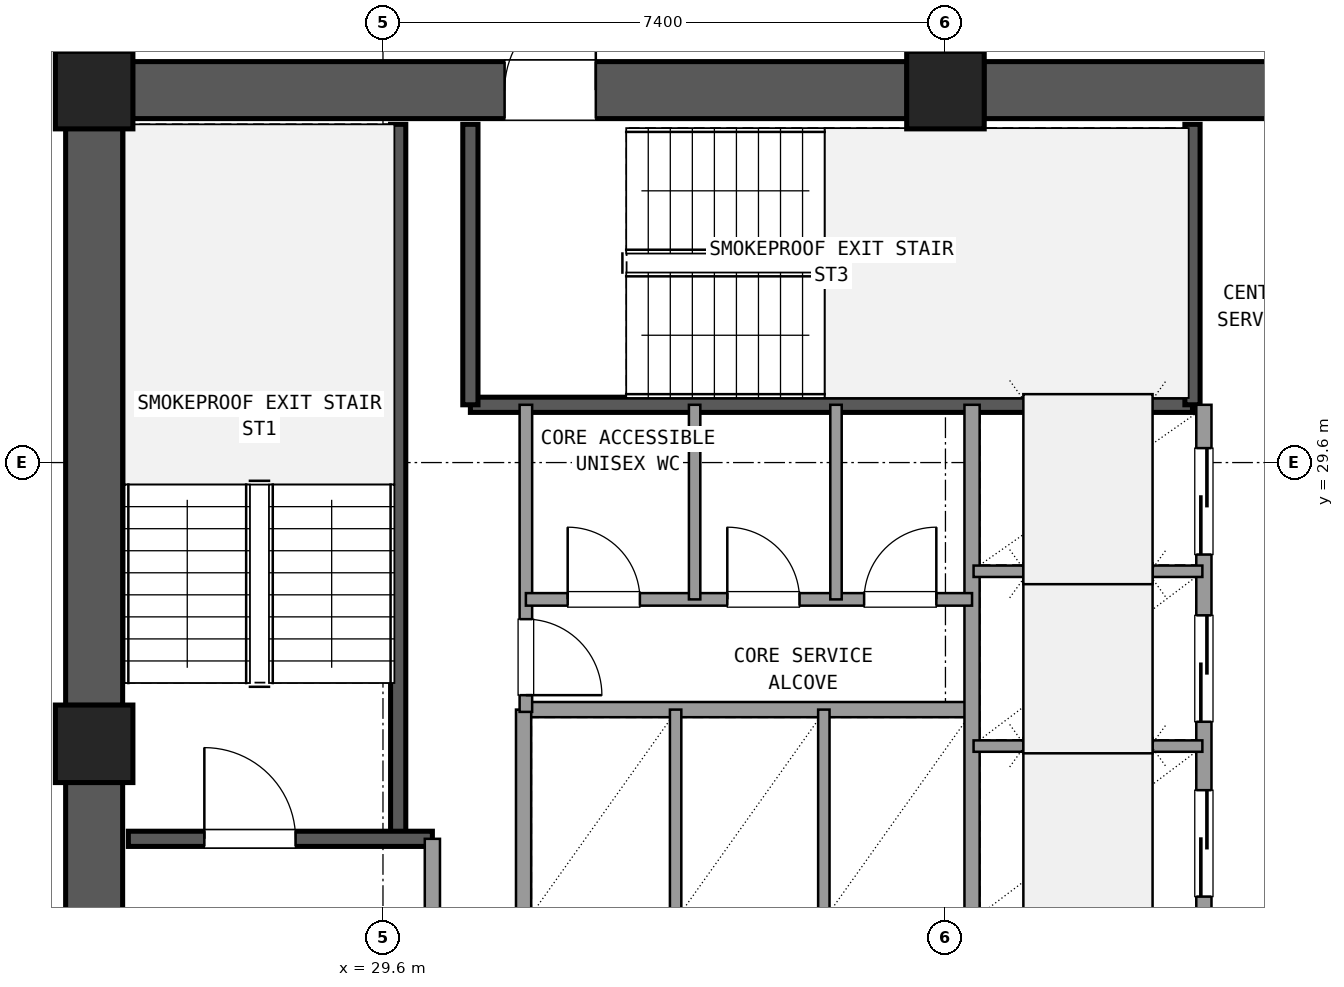
"""IFC4 building model, lengths in metres.
Left out: names, types, materials, properties, quantities, classifications, styles, units other than length and angle.
Written with IfcOpenShell. Run it as: python <this file> out.ifc"""

import sys

from ifc_helpers import new_model, si_unit, direction, frame, frame_2d, origin, origin_2d, place, context, subcontext, project, spatial, rectangle, extrude, element, fill, save


model = new_model("IFC4")
c1 = context("Model", 3, precision=1e-05, world=origin(), true_north=direction((0.0, 1.0)))
c2 = subcontext(c1, "Body", "Model", "MODEL_VIEW")
j1 = project(units=[si_unit("LENGTHUNIT", "METRE"), si_unit("PLANEANGLEUNIT", "RADIAN")], contexts=[c1])
p1 = place(None, origin())
s1 = spatial("IfcSite", under=j1, at=p1, CompositionType="ELEMENT")
p2 = place(p1, origin())
s2 = spatial("IfcBuilding", under=s1, at=p2, CompositionType="ELEMENT")
p3 = place(p2, frame((0.0, 0.0, 152.82)))
s3 = spatial("IfcBuildingStorey", under=s2, at=p3, CompositionType="ELEMENT", Elevation=152.82)
for number, where, z_axis, x_axis in (
    (1, (37.0, 34.5, 0.0), (0.0, 0.0, 1.0), (1.0, 0.0, 0.0)),
    (2, (25.8, 34.5, 0.0), (0.0, 0.0, 1.0), (1.0, 0.0, 0.0)),
    (3, (25.8, 25.9, 0.0), (0.0, 0.0, 1.0), (1.0, 0.0, 0.0)),
):
    element("IfcColumn", number, at=place(p3, frame(where, z_axis=z_axis, x_axis=x_axis)), inside=s3, PredefinedType="COLUMN", context=c2, shape_type="SweptSolid", body=[
        extrude(rectangle(XDim=1.02, YDim=1.02, at=origin_2d()), origin(), (0.0, 0.0, 1.0), 3.6),
    ])
p4 = place(p3, frame((47.695, 34.5, 0.0), z_axis=(0.0, 0.0, 1.0), x_axis=(-1.0, 0.0, 0.0)))
e4 = element("IfcWall", 4, at=p4, inside=s3, PredefinedType="SHEAR", context=c2, shape_type="SweptSolid", body=[
    extrude(rectangle(XDim=10.19, YDim=0.75, at=frame_2d((5.095, 0.0))), origin(), (0.0, 0.0, 1.0), 3.32),
])
p5 = place(p4, frame((4.595, 0.0, 0.0)))
e5 = element("IfcOpeningElement", 5, at=p5, cuts=e4, PredefinedType="OPENING", context=c2, shape_type="SweptSolid", body=[
    extrude(rectangle(XDim=1.6, YDim=2.2, at=frame_2d((0.8, 1.1))), frame((0.0, 0.385, 0.0), z_axis=(0.0, -1.0, 0.0), x_axis=(1.0, 0.0, 0.0)), (0.0, 0.0, 1.0), 0.77),
])
p6 = place(p3, frame((36.495, 34.5, 0.0), z_axis=(0.0, 0.0, 1.0), x_axis=(-1.0, 0.0, 0.0)))
e6 = element("IfcWall", 6, at=p6, inside=s3, PredefinedType="SHEAR", context=c2, shape_type="SweptSolid", body=[
    extrude(rectangle(XDim=10.19, YDim=0.75, at=frame_2d((5.095, 0.0))), origin(), (0.0, 0.0, 1.0), 3.32),
])
p7 = place(p6, frame((4.095, 0.0, 0.0)))
e7 = element("IfcOpeningElement", 7, at=p7, cuts=e6, PredefinedType="OPENING", context=c2, shape_type="SweptSolid", body=[
    extrude(rectangle(XDim=1.2, YDim=2.15, at=frame_2d((0.6, 1.075))), frame((0.0, 0.385, 0.0), z_axis=(0.0, -1.0, 0.0), x_axis=(1.0, 0.0, 0.0)), (0.0, 0.0, 1.0), 0.77),
])
p8 = place(p3, frame((25.8, 33.995, 0.0), z_axis=(0.0, 0.0, 1.0), x_axis=(0.0, -1.0, 0.0)))
e8 = element("IfcWall", 8, at=p8, inside=s3, PredefinedType="SHEAR", context=c2, shape_type="SweptSolid", body=[
    extrude(rectangle(XDim=7.59, YDim=0.75, at=frame_2d((3.795, 0.0))), origin(), (0.0, 0.0, 1.0), 3.32),
])
p9 = place(p3, frame((25.8, 25.395, 0.0), z_axis=(0.0, 0.0, 1.0), x_axis=(0.0, -1.0, 0.0)))
e9 = element("IfcWall", 9, at=p9, inside=s3, PredefinedType="SHEAR", context=c2, shape_type="SweptSolid", body=[
    extrude(rectangle(XDim=7.59, YDim=0.75, at=frame_2d((3.795, 0.0))), origin(), (0.0, 0.0, 1.0), 3.32),
])
p10 = place(p9, frame((2.145, 0.0, 0.0)))
e10 = element("IfcOpeningElement", 10, at=p10, cuts=e9, PredefinedType="OPENING", context=c2, shape_type="SweptSolid", body=[
    extrude(rectangle(XDim=1.2, YDim=2.15, at=frame_2d((0.6, 1.075))), frame((0.0, 0.385, 0.0), z_axis=(0.0, -1.0, 0.0), x_axis=(1.0, 0.0, 0.0)), (0.0, 0.0, 1.0), 0.77),
])
p11 = place(p3, frame((29.8, 24.65, 0.0), z_axis=(0.0, 0.0, 1.0), x_axis=(0.0, 1.0, 0.0)))
e11 = element("IfcWall", 11, at=p11, inside=s3, PredefinedType="SHEAR", context=c2, shape_type="SweptSolid", body=[
    extrude(rectangle(XDim=9.4, YDim=0.2, at=frame_2d((4.7, 0.0))), origin(), (0.0, 0.0, 1.0), 3.32),
])
p12 = place(p3, frame((26.25, 24.65, 0.0), z_axis=(0.0, 0.0, 1.0), x_axis=(1.0, 0.0, 0.0)))
e12 = element("IfcWall", 12, at=p12, inside=s3, PredefinedType="SHEAR", context=c2, shape_type="SweptSolid", body=[
    extrude(rectangle(XDim=4.0, YDim=0.2, at=frame_2d((2.0, 0.0))), origin(), (0.0, 0.0, 1.0), 3.32),
])
p13 = place(p12, frame((1.0, 0.0, 0.0)))
e13 = element("IfcOpeningElement", 13, at=p13, cuts=e12, PredefinedType="OPENING", context=c2, shape_type="SweptSolid", body=[
    extrude(rectangle(XDim=1.2, YDim=2.15, at=frame_2d((0.6, 1.075))), frame((0.0, 0.11, 0.0), z_axis=(0.0, -1.0, 0.0), x_axis=(1.0, 0.0, 0.0)), (0.0, 0.0, 1.0), 0.22),
])
p14 = place(p3, frame((30.75, 30.36, 0.0), z_axis=(0.0, 0.0, 1.0), x_axis=(1.0, 0.0, 0.0)))
e14 = element("IfcWall", 14, at=p14, inside=s3, PredefinedType="SHEAR", context=c2, shape_type="SweptSolid", body=[
    extrude(rectangle(XDim=9.5, YDim=0.2, at=frame_2d((4.75, 0.0))), origin(), (0.0, 0.0, 1.0), 3.32),
])
for number, where, z_axis, x_axis in (
    (15, (30.75, 30.36, 0.0), (0.0, 0.0, 1.0), (0.0, 1.0, 0.0)),
    (16, (40.25, 30.36, 0.0), (0.0, 0.0, 1.0), (0.0, 1.0, 0.0)),
):
    element("IfcWall", number, at=place(p3, frame(where, z_axis=z_axis, x_axis=x_axis)), inside=s3, PredefinedType="SHEAR", context=c2, shape_type="SweptSolid", body=[
        extrude(rectangle(XDim=3.69, YDim=0.2, at=frame_2d((1.845, 0.0))), origin(), (0.0, 0.0, 1.0), 3.32),
    ])
p15 = place(p3, frame((30.25, 17.75, 0.0), z_axis=(0.0, 0.0, 1.0), x_axis=(0.0, 1.0, 0.0)))
e17 = element("IfcWall", 17, at=p15, inside=s3, PredefinedType="SOLIDWALL", context=c2, shape_type="SweptSolid", body=[
    extrude(rectangle(XDim=6.9, YDim=0.2, at=frame_2d((3.45, 0.0))), origin(), (0.0, 0.0, 1.0), 2.61),
])
p16 = place(p15, frame((4.15, 0.0, 0.0)))
e18 = element("IfcOpeningElement", 18, at=p16, cuts=e17, PredefinedType="OPENING", context=c2, shape_type="SweptSolid", body=[
    extrude(rectangle(XDim=1.2, YDim=2.15, at=frame_2d((0.6, 1.075))), frame((0.0, 0.11, 0.0), z_axis=(0.0, -1.0, 0.0), x_axis=(1.0, 0.0, 0.0)), (0.0, 0.0, 1.0), 0.22),
])
p17 = place(p3, frame((31.45, 26.35, 0.0), z_axis=(0.0, 0.0, 1.0), x_axis=(1.0, 0.0, 0.0)))
e19 = element("IfcWall", 19, at=p17, inside=s3, PredefinedType="SOLIDWALL", context=c2, shape_type="SweptSolid", body=[
    extrude(rectangle(XDim=5.9, YDim=0.2, at=frame_2d((2.95, 0.0))), origin(), (0.0, 0.0, 1.0), 2.61),
])
p18 = place(p3, frame((31.45, 23.54, 0.0), z_axis=(0.0, 0.0, 1.0), x_axis=(0.0, 1.0, 0.0)))
e20 = element("IfcWall", 20, at=p18, inside=s3, PredefinedType="SOLIDWALL", context=c2, shape_type="SweptSolid", body=[
    extrude(rectangle(XDim=2.81, YDim=0.2, at=frame_2d((1.405, 0.0))), origin(), (0.0, 0.0, 1.0), 2.61),
])
for number, where, z_axis, x_axis in (
    (21, (33.45, 23.54, 0.0), (0.0, 0.0, 1.0), (0.0, 1.0, 0.0)),
    (22, (35.4, 23.54, 0.0), (0.0, 0.0, 1.0), (0.0, 1.0, 0.0)),
):
    element("IfcWall", number, at=place(p3, frame(where, z_axis=z_axis, x_axis=x_axis)), inside=s3, PredefinedType="PARTITIONING", context=c2, shape_type="SweptSolid", body=[
        extrude(rectangle(XDim=2.81, YDim=0.15, at=frame_2d((1.405, 0.0))), origin(), (0.0, 0.0, 1.0), 2.61),
    ])
p19 = place(p3, frame((37.35, 23.54, 0.0), z_axis=(0.0, 0.0, 1.0), x_axis=(0.0, 1.0, 0.0)))
e23 = element("IfcWall", 23, at=p19, inside=s3, PredefinedType="SOLIDWALL", context=c2, shape_type="SweptSolid", body=[
    extrude(rectangle(XDim=6.82, YDim=0.2, at=frame_2d((3.41, 0.0))), origin(), (0.0, 0.0, 1.0), 2.61),
])
p20 = place(p3, frame((40.4, 23.54, 0.0), z_axis=(0.0, 0.0, 1.0), x_axis=(0.0, 1.0, 0.0)))
e24 = element("IfcWall", 24, at=p20, inside=s3, PredefinedType="SOLIDWALL", context=c2, shape_type="SweptSolid", body=[
    extrude(rectangle(XDim=6.82, YDim=0.2, at=frame_2d((3.41, 0.0))), origin(), (0.0, 0.0, 1.0), 2.61),
])
p21 = place(p20, frame((0.35, 0.0, 0.0)))
e25 = element("IfcOpeningElement", 25, at=p21, cuts=e24, PredefinedType="OPENING", context=c2, shape_type="SweptSolid", body=[
    extrude(rectangle(XDim=1.4, YDim=2.2, at=frame_2d((0.7, 1.1))), frame((0.0, 0.11, 0.0), z_axis=(0.0, -1.0, 0.0), x_axis=(1.0, 0.0, 0.0)), (0.0, 0.0, 1.0), 0.22),
])
p22 = place(p20, frame((2.65, 0.0, 0.0)))
e26 = element("IfcOpeningElement", 26, at=p22, cuts=e24, PredefinedType="OPENING", context=c2, shape_type="SweptSolid", body=[
    extrude(rectangle(XDim=1.4, YDim=2.2, at=frame_2d((0.7, 1.1))), frame((0.0, 0.11, 0.0), z_axis=(0.0, -1.0, 0.0), x_axis=(1.0, 0.0, 0.0)), (0.0, 0.0, 1.0), 0.22),
])
p23 = place(p20, frame((4.85, 0.0, 0.0)))
e27 = element("IfcOpeningElement", 27, at=p23, cuts=e24, PredefinedType="OPENING", context=c2, shape_type="SweptSolid", body=[
    extrude(rectangle(XDim=1.4, YDim=2.2, at=frame_2d((0.7, 1.1))), frame((0.0, 0.11, 0.0), z_axis=(0.0, -1.0, 0.0), x_axis=(1.0, 0.0, 0.0)), (0.0, 0.0, 1.0), 0.22),
])
for number, where, z_axis, x_axis in (
    (28, (37.37, 25.87, 0.0), (0.0, 0.0, 1.0), (1.0, 0.0, 0.0)),
    (29, (37.37, 28.17, 0.0), (0.0, 0.0, 1.0), (1.0, 0.0, 0.0)),
):
    element("IfcWall", number, at=place(p3, frame(where, z_axis=z_axis, x_axis=x_axis)), inside=s3, PredefinedType="PARTITIONING", context=c2, shape_type="SweptSolid", body=[
        extrude(rectangle(XDim=3.01, YDim=0.15, at=frame_2d((1.505, 0.0))), origin(), (0.0, 0.0, 1.0), 2.61),
    ])
p24 = place(p3, frame((31.48, 26.32, 0.0), z_axis=(0.0, 0.0, 1.0), x_axis=(0.0, 1.0, 0.0)))
e30 = element("IfcWall", 30, at=p24, inside=s3, PredefinedType="PLUMBINGWALL", context=c2, shape_type="SweptSolid", body=[
    extrude(rectangle(XDim=4.04, YDim=0.165, at=frame_2d((2.02, 0.0))), origin(), (0.0, 0.0, 1.0), 2.61),
])
p25 = place(p24, frame((0.22, 0.0, 0.0)))
e31 = element("IfcOpeningElement", 31, at=p25, cuts=e30, PredefinedType="OPENING", context=c2, shape_type="SweptSolid", body=[
    extrude(rectangle(XDim=1.0, YDim=2.15, at=frame_2d((0.5, 1.075))), frame((0.0, 0.093, 0.0), z_axis=(0.0, -1.0, 0.0), x_axis=(1.0, 0.0, 0.0)), (0.0, 0.0, 1.0), 0.185),
])
p26 = place(p3, frame((31.48, 27.8, 0.0), z_axis=(0.0, 0.0, 1.0), x_axis=(1.0, 0.0, 0.0)))
e32 = element("IfcWall", 32, at=p26, inside=s3, PredefinedType="PLUMBINGWALL", context=c2, shape_type="SweptSolid", body=[
    extrude(rectangle(XDim=5.87, YDim=0.165, at=frame_2d((2.935, 0.0))), origin(), (0.0, 0.0, 1.0), 2.61),
])
p27 = place(p26, frame((0.55, 0.0, 0.0)))
e33 = element("IfcOpeningElement", 33, at=p27, cuts=e32, PredefinedType="OPENING", context=c2, shape_type="SweptSolid", body=[
    extrude(rectangle(XDim=0.95, YDim=2.1, at=frame_2d((0.475, 1.05))), frame((0.0, 0.093, 0.0), z_axis=(0.0, -1.0, 0.0), x_axis=(1.0, 0.0, 0.0)), (0.0, 0.0, 1.0), 0.185),
])
p28 = place(p26, frame((2.65, 0.0, 0.0)))
e34 = element("IfcOpeningElement", 34, at=p28, cuts=e32, PredefinedType="OPENING", context=c2, shape_type="SweptSolid", body=[
    extrude(rectangle(XDim=0.95, YDim=2.1, at=frame_2d((0.475, 1.05))), frame((0.0, 0.093, 0.0), z_axis=(0.0, -1.0, 0.0), x_axis=(1.0, 0.0, 0.0)), (0.0, 0.0, 1.0), 0.185),
])
p29 = place(p26, frame((4.45, 0.0, 0.0)))
e35 = element("IfcOpeningElement", 35, at=p29, cuts=e32, PredefinedType="OPENING", context=c2, shape_type="SweptSolid", body=[
    extrude(rectangle(XDim=0.95, YDim=2.1, at=frame_2d((0.475, 1.05))), frame((0.0, 0.093, 0.0), z_axis=(0.0, -1.0, 0.0), x_axis=(1.0, 0.0, 0.0)), (0.0, 0.0, 1.0), 0.185),
])
for number, where, z_axis, x_axis in (
    (36, (33.7, 27.8, 0.0), (0.0, 0.0, 1.0), (0.0, 1.0, 0.0)),
    (37, (35.56, 27.8, 0.0), (0.0, 0.0, 1.0), (0.0, 1.0, 0.0)),
):
    element("IfcWall", number, at=place(p3, frame(where, z_axis=z_axis, x_axis=x_axis)), inside=s3, PredefinedType="PARTITIONING", context=c2, shape_type="SweptSolid", body=[
        extrude(rectangle(XDim=2.56, YDim=0.15, at=frame_2d((1.28, 0.0))), origin(), (0.0, 0.0, 1.0), 2.61),
    ])
p30 = place(p3, frame((37.0, 34.95, 0.0), z_axis=(0.0, 0.0, 1.0), x_axis=(0.0, 1.0, 0.0)))
e38 = element("IfcWall", 38, at=p30, inside=s3, PredefinedType="PARTITIONING", context=c2, shape_type="SweptSolid", body=[
    extrude(rectangle(XDim=3.21, YDim=0.18, at=frame_2d((1.605, 0.0))), origin(), (0.0, 0.0, 1.0), 2.61),
])
p31 = place(p30, frame((0.605, 0.0, 0.0)))
e39 = element("IfcOpeningElement", 39, at=p31, cuts=e38, PredefinedType="OPENING", context=c2, shape_type="SweptSolid", body=[
    extrude(rectangle(XDim=2.0, YDim=2.2, at=frame_2d((1.0, 1.1))), frame((0.0, 0.1, 0.0), z_axis=(0.0, -1.0, 0.0), x_axis=(1.0, 0.0, 0.0)), (0.0, 0.0, 1.0), 0.2),
])
p32 = place(p13, origin())
e40 = element("IfcDoor", 40, at=p32, inside=s3, OperationType="SINGLE_SWING_LEFT", PredefinedType="DOOR", context=c2, shape_type="SweptSolid", body=[
    extrude(rectangle(XDim=1.2, YDim=2.15, at=frame_2d((0.6, 1.075))), frame((0.0, 0.025, 0.0), z_axis=(0.0, -1.0, 0.0), x_axis=(1.0, 0.0, 0.0)), (0.0, 0.0, 1.0), 0.05),
])
fill(e13, e40)
p33 = place(p7, frame((1.2, 0.0, 0.0), z_axis=(0.0, 0.0, 1.0), x_axis=(-1.0, 0.0, 0.0)))
e41 = element("IfcDoor", 41, at=p33, inside=s3, OperationType="SINGLE_SWING_LEFT", PredefinedType="DOOR", context=c2, shape_type="SweptSolid", body=[
    extrude(rectangle(XDim=1.2, YDim=2.15, at=frame_2d((0.6, 1.075))), frame((0.0, 0.025, 0.0), z_axis=(0.0, -1.0, 0.0), x_axis=(1.0, 0.0, 0.0)), (0.0, 0.0, 1.0), 0.05),
])
fill(e7, e41)
p34 = place(p21, origin())
e42 = element("IfcDoor", 42, at=p34, inside=s3, OperationType="SLIDING_TO_LEFT", PredefinedType="DOOR", context=c2, shape_type="SweptSolid", body=[
    extrude(rectangle(XDim=1.4, YDim=2.2, at=frame_2d((0.7, 1.1))), frame((0.0, 0.025, 0.0), z_axis=(0.0, -1.0, 0.0), x_axis=(1.0, 0.0, 0.0)), (0.0, 0.0, 1.0), 0.05),
])
fill(e25, e42)
p35 = place(p22, origin())
e43 = element("IfcDoor", 43, at=p35, inside=s3, OperationType="SLIDING_TO_LEFT", PredefinedType="DOOR", context=c2, shape_type="SweptSolid", body=[
    extrude(rectangle(XDim=1.4, YDim=2.2, at=frame_2d((0.7, 1.1))), frame((0.0, 0.025, 0.0), z_axis=(0.0, -1.0, 0.0), x_axis=(1.0, 0.0, 0.0)), (0.0, 0.0, 1.0), 0.05),
])
fill(e26, e43)
p36 = place(p23, origin())
e44 = element("IfcDoor", 44, at=p36, inside=s3, OperationType="SLIDING_TO_RIGHT", PredefinedType="DOOR", context=c2, shape_type="SweptSolid", body=[
    extrude(rectangle(XDim=1.4, YDim=2.2, at=frame_2d((0.7, 1.1))), frame((0.0, 0.025, 0.0), z_axis=(0.0, -1.0, 0.0), x_axis=(1.0, 0.0, 0.0)), (0.0, 0.0, 1.0), 0.05),
])
fill(e27, e44)
p37 = place(p25, frame((1.0, 0.0, 0.0), z_axis=(0.0, 0.0, 1.0), x_axis=(-1.0, 0.0, 0.0)))
e45 = element("IfcDoor", 45, at=p37, inside=s3, OperationType="SINGLE_SWING_LEFT", PredefinedType="DOOR", context=c2, shape_type="SweptSolid", body=[
    extrude(rectangle(XDim=1.0, YDim=2.15, at=frame_2d((0.5, 1.075))), frame((0.0, 0.025, 0.0), z_axis=(0.0, -1.0, 0.0), x_axis=(1.0, 0.0, 0.0)), (0.0, 0.0, 1.0), 0.05),
])
fill(e31, e45)
p38 = place(p27, origin())
e46 = element("IfcDoor", 46, at=p38, inside=s3, OperationType="SINGLE_SWING_LEFT", PredefinedType="DOOR", context=c2, shape_type="SweptSolid", body=[
    extrude(rectangle(XDim=0.95, YDim=2.1, at=frame_2d((0.475, 1.05))), frame((0.0, 0.025, 0.0), z_axis=(0.0, -1.0, 0.0), x_axis=(1.0, 0.0, 0.0)), (0.0, 0.0, 1.0), 0.05),
])
fill(e33, e46)
p39 = place(p28, origin())
e47 = element("IfcDoor", 47, at=p39, inside=s3, OperationType="SINGLE_SWING_LEFT", PredefinedType="DOOR", context=c2, shape_type="SweptSolid", body=[
    extrude(rectangle(XDim=0.95, YDim=2.1, at=frame_2d((0.475, 1.05))), frame((0.0, 0.025, 0.0), z_axis=(0.0, -1.0, 0.0), x_axis=(1.0, 0.0, 0.0)), (0.0, 0.0, 1.0), 0.05),
])
fill(e34, e47)
p40 = place(p29, origin())
e48 = element("IfcDoor", 48, at=p40, inside=s3, OperationType="SINGLE_SWING_RIGHT", PredefinedType="DOOR", context=c2, shape_type="SweptSolid", body=[
    extrude(rectangle(XDim=0.95, YDim=2.1, at=frame_2d((0.475, 1.05))), frame((0.0, 0.025, 0.0), z_axis=(0.0, -1.0, 0.0), x_axis=(1.0, 0.0, 0.0)), (0.0, 0.0, 1.0), 0.05),
])
fill(e35, e48)
save(model, sys.argv[1])
